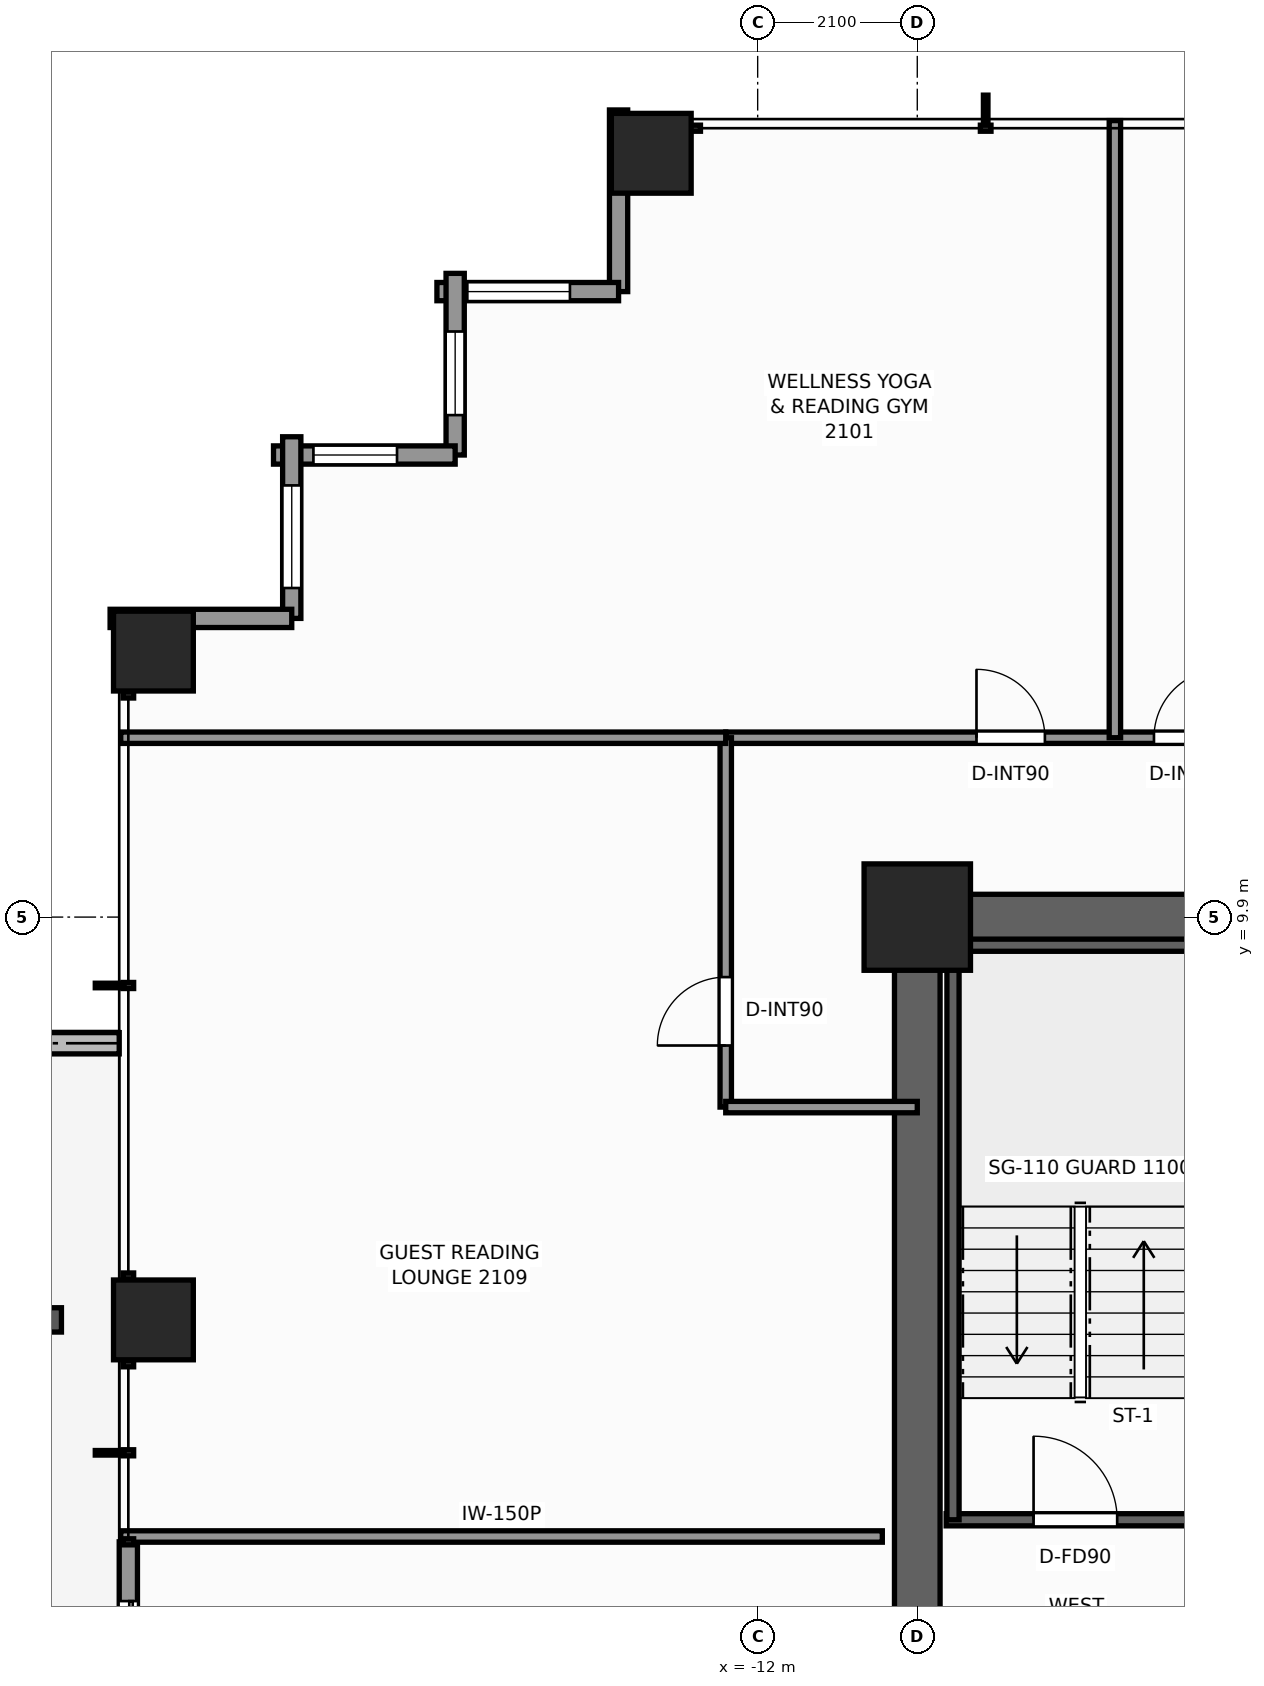
"""IFC4 building model, lengths in metres.
Left out: names, types, materials, properties, quantities, classifications, styles, units other than length and angle.
Written with IfcOpenShell. Run it as: python <this file> out.ifc"""

import sys

from ifc_helpers import new_model, si_unit, direction, frame, frame_2d, origin, origin_2d, place, context, subcontext, project, spatial, rectangle, extrude, element, fill, save


model = new_model("IFC4")
c1 = context("Model", 3, precision=1e-05, world=origin(), true_north=direction((0.0, 1.0)))
c2 = subcontext(c1, "Body", "Model", "MODEL_VIEW")
j1 = project(units=[si_unit("LENGTHUNIT", "METRE"), si_unit("PLANEANGLEUNIT", "RADIAN")], contexts=[c1])
p1 = place(None, origin())
s1 = spatial("IfcSite", under=j1, at=p1, CompositionType="ELEMENT")
p2 = place(p1, origin())
s2 = spatial("IfcBuilding", under=s1, at=p2, CompositionType="ELEMENT")
p3 = place(p2, frame((0.0, 0.0, 75.5)))
s3 = spatial("IfcBuildingStorey", under=s2, at=p3, CompositionType="ELEMENT", Elevation=75.5)
p4 = place(p3, frame((-10.2, 9.9, 0.0), z_axis=(0.0, 0.0, 1.0), x_axis=(1.0, 0.0, 0.0)))
e1 = element("IfcWall", 1, at=p4, inside=s3, PredefinedType="SHEAR", context=c2, shape_type="SweptSolid", body=[
    extrude(rectangle(XDim=14.62, YDim=0.6, at=frame_2d((7.31, 0.0))), origin(), (0.0, 0.0, 1.0), 3.3),
])
p5 = place(p3, frame((-9.9, -3.7, 0.0), z_axis=(0.0, 0.0, 1.0), x_axis=(0.0, 1.0, 0.0)))
e2 = element("IfcWall", 2, at=p5, inside=s3, PredefinedType="SHEAR", context=c2, shape_type="SweptSolid", body=[
    extrude(rectangle(XDim=13.3, YDim=0.6, at=frame_2d((6.65, 0.0))), origin(), (0.0, 0.0, 1.0), 3.3),
])
p6 = place(p5, frame((0.35, 0.0, 0.0)))
e3 = element("IfcOpeningElement", 3, at=p6, cuts=e2, PredefinedType="OPENING", context=c2, shape_type="SweptSolid", body=[
    extrude(rectangle(XDim=1.1, YDim=2.2, at=frame_2d((0.55, 1.1))), frame((0.0, 0.31, 0.0), z_axis=(0.0, -1.0, 0.0), x_axis=(1.0, 0.0, 0.0)), (0.0, 0.0, 1.0), 0.62),
])
p7 = place(p3, frame((-9.9, 9.9, 0.0), z_axis=(0.0, 0.0, 1.0), x_axis=(1.0, 0.0, 0.0)))
e4 = element("IfcColumn", 4, at=p7, inside=s3, PredefinedType="COLUMN", context=c2, shape_type="SweptSolid", body=[
    extrude(rectangle(XDim=1.4, YDim=1.4, at=origin_2d()), origin(), (0.0, 0.0, 1.0), 3.3),
])
for number, where, z_axis, x_axis in (
    (5, (-13.4, 19.95, 0.0), (0.0, 0.0, 1.0), (1.0, 0.0, 0.0)),
    (6, (-19.95, 4.6, 0.0), (0.0, 0.0, 1.0), (1.0, 0.0, 0.0)),
    (7, (-19.95, 13.4, 0.0), (0.0, 0.0, 1.0), (1.0, 0.0, 0.0)),
):
    element("IfcColumn", number, at=place(p3, frame(where, z_axis=z_axis, x_axis=x_axis)), inside=s3, PredefinedType="COLUMN", context=c2, shape_type="SweptSolid", body=[
        extrude(rectangle(XDim=1.05, YDim=1.05, at=origin_2d()), origin(), (0.0, 0.0, 1.0), 3.3),
    ])
p8 = place(p3, frame((-20.4, 8.24, -0.04), z_axis=(0.0, 0.0, 1.0), x_axis=(-1.0, 0.0, 0.0)))
e8 = element("IfcWall", 8, at=p8, inside=s3, PredefinedType="PARAPET", context=c2, shape_type="SweptSolid", body=[
    extrude(rectangle(XDim=1.26, YDim=0.28, at=frame_2d((0.63, 0.0))), origin(), (0.0, 0.0, 1.0), 0.42),
])
p9 = place(p3, frame((-13.83, 18.13, 0.0), z_axis=(0.0, 0.0, 1.0), x_axis=(0.0, 1.0, 0.0)))
e9 = element("IfcWall", 9, at=p9, inside=s3, PredefinedType="STANDARD", context=c2, shape_type="SweptSolid", body=[
    extrude(rectangle(XDim=2.39, YDim=0.24, at=frame_2d((1.195, 0.0))), origin(), (0.0, 0.0, 1.0), 2.459),
])
p10 = place(p3, frame((-16.22, 18.13, 0.0), z_axis=(0.0, 0.0, 1.0), x_axis=(1.0, 0.0, 0.0)))
e10 = element("IfcWall", 10, at=p10, inside=s3, PredefinedType="STANDARD", context=c2, shape_type="SweptSolid", body=[
    extrude(rectangle(XDim=2.39, YDim=0.24, at=frame_2d((1.195, 0.0))), origin(), (0.0, 0.0, 1.0), 2.459),
])
p11 = place(p10, frame((0.4, 0.0, 0.65)))
e11 = element("IfcOpeningElement", 11, at=p11, cuts=e10, PredefinedType="OPENING", context=c2, shape_type="SweptSolid", body=[
    extrude(rectangle(XDim=1.35, YDim=1.55, at=frame_2d((0.675, 0.775))), frame((0.0, 0.13, 0.0), z_axis=(0.0, -1.0, 0.0), x_axis=(1.0, 0.0, 0.0)), (0.0, 0.0, 1.0), 0.26),
])
p12 = place(p3, frame((-15.98, 15.98, 0.0), z_axis=(0.0, 0.0, 1.0), x_axis=(0.0, 1.0, 0.0)))
e12 = element("IfcWall", 12, at=p12, inside=s3, PredefinedType="STANDARD", context=c2, shape_type="SweptSolid", body=[
    extrude(rectangle(XDim=2.39, YDim=0.24, at=frame_2d((1.195, 0.0))), origin(), (0.0, 0.0, 1.0), 2.459),
])
p13 = place(p12, frame((0.525, 0.0, 0.65)))
e13 = element("IfcOpeningElement", 13, at=p13, cuts=e12, PredefinedType="OPENING", context=c2, shape_type="SweptSolid", body=[
    extrude(rectangle(XDim=1.1, YDim=1.45, at=frame_2d((0.55, 0.725))), frame((0.0, 0.13, 0.0), z_axis=(0.0, -1.0, 0.0), x_axis=(1.0, 0.0, 0.0)), (0.0, 0.0, 1.0), 0.26),
])
p14 = place(p3, frame((-18.37, 15.98, 0.0), z_axis=(0.0, 0.0, 1.0), x_axis=(1.0, 0.0, 0.0)))
e14 = element("IfcWall", 14, at=p14, inside=s3, PredefinedType="STANDARD", context=c2, shape_type="SweptSolid", body=[
    extrude(rectangle(XDim=2.39, YDim=0.24, at=frame_2d((1.195, 0.0))), origin(), (0.0, 0.0, 1.0), 2.459),
])
p15 = place(p14, frame((0.525, 0.0, 0.65)))
e15 = element("IfcOpeningElement", 15, at=p15, cuts=e14, PredefinedType="OPENING", context=c2, shape_type="SweptSolid", body=[
    extrude(rectangle(XDim=1.1, YDim=1.45, at=frame_2d((0.55, 0.725))), frame((0.0, 0.13, 0.0), z_axis=(0.0, -1.0, 0.0), x_axis=(1.0, 0.0, 0.0)), (0.0, 0.0, 1.0), 0.26),
])
p16 = place(p3, frame((-18.13, 13.83, 0.0), z_axis=(0.0, 0.0, 1.0), x_axis=(0.0, 1.0, 0.0)))
e16 = element("IfcWall", 16, at=p16, inside=s3, PredefinedType="STANDARD", context=c2, shape_type="SweptSolid", body=[
    extrude(rectangle(XDim=2.39, YDim=0.24, at=frame_2d((1.195, 0.0))), origin(), (0.0, 0.0, 1.0), 2.459),
])
p17 = place(p16, frame((0.4, 0.0, 0.65)))
e17 = element("IfcOpeningElement", 17, at=p17, cuts=e16, PredefinedType="OPENING", context=c2, shape_type="SweptSolid", body=[
    extrude(rectangle(XDim=1.35, YDim=1.55, at=frame_2d((0.675, 0.775))), frame((0.0, 0.13, 0.0), z_axis=(0.0, -1.0, 0.0), x_axis=(1.0, 0.0, 0.0)), (0.0, 0.0, 1.0), 0.26),
])
p18 = place(p3, frame((-20.52, 13.83, 0.0), z_axis=(0.0, 0.0, 1.0), x_axis=(1.0, 0.0, 0.0)))
e18 = element("IfcWall", 18, at=p18, inside=s3, PredefinedType="STANDARD", context=c2, shape_type="SweptSolid", body=[
    extrude(rectangle(XDim=2.39, YDim=0.24, at=frame_2d((1.195, 0.0))), origin(), (0.0, 0.0, 1.0), 2.459),
])
p19 = place(p3, frame((-20.28, -1.68, 0.0), z_axis=(0.0, 0.0, 1.0), x_axis=(0.0, 1.0, 0.0)))
e19 = element("IfcWall", 19, at=p19, inside=s3, PredefinedType="STANDARD", context=c2, shape_type="SweptSolid", body=[
    extrude(rectangle(XDim=3.36, YDim=0.24, at=frame_2d((1.68, 0.0))), origin(), (0.0, 0.0, 1.0), 3.08),
])
p20 = place(p19, frame((0.78, 0.0, 0.0)))
e20 = element("IfcOpeningElement", 20, at=p20, cuts=e19, PredefinedType="OPENING", context=c2, shape_type="SweptSolid", body=[
    extrude(rectangle(XDim=1.8, YDim=2.2, at=frame_2d((0.9, 1.1))), frame((0.0, 0.13, 0.0), z_axis=(0.0, -1.0, 0.0), x_axis=(1.0, 0.0, 0.0)), (0.0, 0.0, 1.0), 0.26),
])
p21 = place(p3, frame((-9.52, 1.97, 0.0), z_axis=(0.0, 0.0, 1.0), x_axis=(1.0, 0.0, 0.0)))
e21 = element("IfcWall", 21, at=p21, inside=s3, PredefinedType="SHEAR", context=c2, shape_type="SweptSolid", body=[
    extrude(rectangle(XDim=3.52, YDim=0.16, at=frame_2d((1.76, 0.0))), origin(), (0.0, 0.0, 1.0), 3.3),
])
p22 = place(p21, frame((1.15, 0.0, 0.0)))
e22 = element("IfcOpeningElement", 22, at=p22, cuts=e21, PredefinedType="OPENING", context=c2, shape_type="SweptSolid", body=[
    extrude(rectangle(XDim=1.1, YDim=2.2, at=frame_2d((0.55, 1.1))), frame((0.0, 0.09, 0.0), z_axis=(0.0, -1.0, 0.0), x_axis=(1.0, 0.0, 0.0)), (0.0, 0.0, 1.0), 0.18),
])
p23 = place(p3, frame((-9.52, 9.53, 0.0), z_axis=(0.0, 0.0, 1.0), x_axis=(1.0, 0.0, 0.0)))
e23 = element("IfcWall", 23, at=p23, inside=s3, PredefinedType="SHEAR", context=c2, shape_type="SweptSolid", body=[
    extrude(rectangle(XDim=3.52, YDim=0.16, at=frame_2d((1.76, 0.0))), origin(), (0.0, 0.0, 1.0), 3.3),
])
p24 = place(p3, frame((-9.43, 1.97, 0.0), z_axis=(0.0, 0.0, 1.0), x_axis=(0.0, 1.0, 0.0)))
e24 = element("IfcWall", 24, at=p24, inside=s3, PredefinedType="SHEAR", context=c2, shape_type="SweptSolid", body=[
    extrude(rectangle(XDim=7.56, YDim=0.16, at=frame_2d((3.78, 0.0))), origin(), (0.0, 0.0, 1.0), 3.3),
])
p25 = place(p3, frame((-12.42, 12.26, 0.0), z_axis=(0.0, 0.0, 1.0), x_axis=(1.0, 0.0, 0.0)))
e25 = element("IfcWall", 25, at=p25, inside=s3, PredefinedType="PARTITIONING", context=c2, shape_type="SweptSolid", body=[
    extrude(rectangle(XDim=25.0, YDim=0.15, at=frame_2d((12.5, 0.0))), origin(), (0.0, 0.0, 1.0), 2.292),
])
p26 = place(p25, frame((3.299, 0.0, 0.0)))
e26 = element("IfcOpeningElement", 26, at=p26, cuts=e25, PredefinedType="OPENING", context=c2, shape_type="SweptSolid", body=[
    extrude(rectangle(XDim=0.9, YDim=2.06, at=frame_2d((0.45, 1.03))), frame((0.0, 0.085, 0.0), z_axis=(0.0, -1.0, 0.0), x_axis=(1.0, 0.0, 0.0)), (0.0, 0.0, 1.0), 0.17),
])
p27 = place(p25, frame((5.634, 0.0, 0.0)))
e27 = element("IfcOpeningElement", 27, at=p27, cuts=e25, PredefinedType="OPENING", context=c2, shape_type="SweptSolid", body=[
    extrude(rectangle(XDim=0.9, YDim=2.06, at=frame_2d((0.45, 1.03))), frame((0.0, 0.085, 0.0), z_axis=(0.0, -1.0, 0.0), x_axis=(1.0, 0.0, 0.0)), (0.0, 0.0, 1.0), 0.17),
])
p28 = place(p25, frame((9.758, 0.0, 0.0)))
e28 = element("IfcOpeningElement", 28, at=p28, cuts=e25, PredefinedType="OPENING", context=c2, shape_type="SweptSolid", body=[
    extrude(rectangle(XDim=0.9, YDim=2.06, at=frame_2d((0.45, 1.03))), frame((0.0, 0.085, 0.0), z_axis=(0.0, -1.0, 0.0), x_axis=(1.0, 0.0, 0.0)), (0.0, 0.0, 1.0), 0.17),
])
p29 = place(p25, frame((13.357, 0.0, 0.0)))
e29 = element("IfcOpeningElement", 29, at=p29, cuts=e25, PredefinedType="OPENING", context=c2, shape_type="SweptSolid", body=[
    extrude(rectangle(XDim=0.95, YDim=2.06, at=frame_2d((0.475, 1.03))), frame((0.0, 0.085, 0.0), z_axis=(0.0, -1.0, 0.0), x_axis=(1.0, 0.0, 0.0)), (0.0, 0.0, 1.0), 0.17),
])
p30 = place(p25, frame((18.125, 0.0, 0.0)))
e30 = element("IfcOpeningElement", 30, at=p30, cuts=e25, PredefinedType="OPENING", context=c2, shape_type="SweptSolid", body=[
    extrude(rectangle(XDim=0.9, YDim=2.06, at=frame_2d((0.45, 1.03))), frame((0.0, 0.085, 0.0), z_axis=(0.0, -1.0, 0.0), x_axis=(1.0, 0.0, 0.0)), (0.0, 0.0, 1.0), 0.17),
])
p31 = place(p25, frame((20.129, 0.0, 0.0)))
e31 = element("IfcOpeningElement", 31, at=p31, cuts=e25, PredefinedType="OPENING", context=c2, shape_type="SweptSolid", body=[
    extrude(rectangle(XDim=0.95, YDim=2.06, at=frame_2d((0.475, 1.03))), frame((0.0, 0.085, 0.0), z_axis=(0.0, -1.0, 0.0), x_axis=(1.0, 0.0, 0.0)), (0.0, 0.0, 1.0), 0.17),
])
p32 = place(p3, frame((-12.42, 7.4, 0.0), z_axis=(0.0, 0.0, 1.0), x_axis=(0.0, 1.0, 0.0)))
e32 = element("IfcWall", 32, at=p32, inside=s3, PredefinedType="PARTITIONING", context=c2, shape_type="SweptSolid", body=[
    extrude(rectangle(XDim=4.86, YDim=0.15, at=frame_2d((2.43, 0.0))), origin(), (0.0, 0.0, 1.0), 2.292),
])
p33 = place(p32, frame((0.81, 0.0, 0.0)))
e33 = element("IfcOpeningElement", 33, at=p33, cuts=e32, PredefinedType="OPENING", context=c2, shape_type="SweptSolid", body=[
    extrude(rectangle(XDim=0.9, YDim=2.06, at=frame_2d((0.45, 1.03))), frame((0.0, 0.085, 0.0), z_axis=(0.0, -1.0, 0.0), x_axis=(1.0, 0.0, 0.0)), (0.0, 0.0, 1.0), 0.17),
])
p34 = place(p3, frame((-12.42, 7.4, 0.0), z_axis=(0.0, 0.0, 1.0), x_axis=(1.0, 0.0, 0.0)))
e34 = element("IfcWall", 34, at=p34, inside=s3, PredefinedType="PARTITIONING", context=c2, shape_type="SweptSolid", body=[
    extrude(rectangle(XDim=2.52, YDim=0.15, at=frame_2d((1.26, 0.0))), origin(), (0.0, 0.0, 1.0), 3.08),
])
p35 = place(p3, frame((-20.38, 12.26, 0.0), z_axis=(0.0, 0.0, 1.0), x_axis=(1.0, 0.0, 0.0)))
e35 = element("IfcWall", 35, at=p35, inside=s3, PredefinedType="PARTITIONING", context=c2, shape_type="SweptSolid", body=[
    extrude(rectangle(XDim=7.96, YDim=0.15, at=frame_2d((3.98, 0.0))), origin(), (0.0, 0.0, 1.0), 2.292),
])
p36 = place(p3, frame((-7.3, 12.26, 0.0), z_axis=(0.0, 0.0, 1.0), x_axis=(0.0, 1.0, 0.0)))
e36 = element("IfcWall", 36, at=p36, inside=s3, PredefinedType="PARTITIONING", context=c2, shape_type="SweptSolid", body=[
    extrude(rectangle(XDim=8.12, YDim=0.15, at=frame_2d((4.06, 0.0))), origin(), (0.0, 0.0, 1.0), 2.449),
])
p37 = place(p3, frame((-20.38, 1.75, 0.0), z_axis=(0.0, 0.0, 1.0), x_axis=(1.0, 0.0, 0.0)))
e37 = element("IfcWall", 37, at=p37, inside=s3, PredefinedType="PARTITIONING", context=c2, shape_type="SweptSolid", body=[
    extrude(rectangle(XDim=10.02, YDim=0.15, at=frame_2d((5.01, 0.0))), origin(), (0.0, 0.0, 1.0), 2.449),
])
p38 = place(p11, origin())
e38 = element("IfcWindow", 38, at=p38, inside=s3, PartitioningType="SINGLE_PANEL", PredefinedType="WINDOW", context=c2, shape_type="SweptSolid", body=[
    extrude(rectangle(XDim=1.35, YDim=1.55, at=frame_2d((0.675, 0.775))), frame((0.0, 0.03, 0.0), z_axis=(0.0, -1.0, 0.0), x_axis=(1.0, 0.0, 0.0)), (0.0, 0.0, 1.0), 0.06),
])
fill(e11, e38)
p39 = place(p13, origin())
e39 = element("IfcWindow", 39, at=p39, inside=s3, PartitioningType="SINGLE_PANEL", PredefinedType="WINDOW", context=c2, shape_type="SweptSolid", body=[
    extrude(rectangle(XDim=1.1, YDim=1.45, at=frame_2d((0.55, 0.725))), frame((0.0, 0.03, 0.0), z_axis=(0.0, -1.0, 0.0), x_axis=(1.0, 0.0, 0.0)), (0.0, 0.0, 1.0), 0.06),
])
fill(e13, e39)
p40 = place(p15, origin())
e40 = element("IfcWindow", 40, at=p40, inside=s3, PartitioningType="SINGLE_PANEL", PredefinedType="WINDOW", context=c2, shape_type="SweptSolid", body=[
    extrude(rectangle(XDim=1.1, YDim=1.45, at=frame_2d((0.55, 0.725))), frame((0.0, 0.03, 0.0), z_axis=(0.0, -1.0, 0.0), x_axis=(1.0, 0.0, 0.0)), (0.0, 0.0, 1.0), 0.06),
])
fill(e15, e40)
p41 = place(p17, origin())
e41 = element("IfcWindow", 41, at=p41, inside=s3, PartitioningType="SINGLE_PANEL", PredefinedType="WINDOW", context=c2, shape_type="SweptSolid", body=[
    extrude(rectangle(XDim=1.35, YDim=1.55, at=frame_2d((0.675, 0.775))), frame((0.0, 0.03, 0.0), z_axis=(0.0, -1.0, 0.0), x_axis=(1.0, 0.0, 0.0)), (0.0, 0.0, 1.0), 0.06),
])
fill(e17, e41)
p42 = place(p20, origin())
e42 = element("IfcDoor", 42, at=p42, inside=s3, OperationType="DOUBLE_DOOR_SLIDING", PredefinedType="DOOR", context=c2, shape_type="SweptSolid", body=[
    extrude(rectangle(XDim=1.8, YDim=2.2, at=frame_2d((0.9, 1.1))), frame((0.0, 0.025, 0.0), z_axis=(0.0, -1.0, 0.0), x_axis=(1.0, 0.0, 0.0)), (0.0, 0.0, 1.0), 0.05),
])
fill(e20, e42)
p43 = place(p22, origin())
e43 = element("IfcDoor", 43, at=p43, inside=s3, OperationType="SINGLE_SWING_LEFT", PredefinedType="DOOR", context=c2, shape_type="SweptSolid", body=[
    extrude(rectangle(XDim=1.1, YDim=2.2, at=frame_2d((0.55, 1.1))), frame((0.0, 0.025, 0.0), z_axis=(0.0, -1.0, 0.0), x_axis=(1.0, 0.0, 0.0)), (0.0, 0.0, 1.0), 0.05),
])
fill(e22, e43)
p44 = place(p26, origin())
e44 = element("IfcDoor", 44, at=p44, inside=s3, OperationType="SINGLE_SWING_LEFT", PredefinedType="DOOR", context=c2, shape_type="SweptSolid", body=[
    extrude(rectangle(XDim=0.9, YDim=2.06, at=frame_2d((0.45, 1.03))), frame((0.0, 0.025, 0.0), z_axis=(0.0, -1.0, 0.0), x_axis=(1.0, 0.0, 0.0)), (0.0, 0.0, 1.0), 0.05),
])
fill(e26, e44)
p45 = place(p27, origin())
e45 = element("IfcDoor", 45, at=p45, inside=s3, OperationType="SINGLE_SWING_RIGHT", PredefinedType="DOOR", context=c2, shape_type="SweptSolid", body=[
    extrude(rectangle(XDim=0.9, YDim=2.06, at=frame_2d((0.45, 1.03))), frame((0.0, 0.025, 0.0), z_axis=(0.0, -1.0, 0.0), x_axis=(1.0, 0.0, 0.0)), (0.0, 0.0, 1.0), 0.05),
])
fill(e27, e45)
p46 = place(p33, origin())
e46 = element("IfcDoor", 46, at=p46, inside=s3, OperationType="SINGLE_SWING_LEFT", PredefinedType="DOOR", context=c2, shape_type="SweptSolid", body=[
    extrude(rectangle(XDim=0.9, YDim=2.06, at=frame_2d((0.45, 1.03))), frame((0.0, 0.025, 0.0), z_axis=(0.0, -1.0, 0.0), x_axis=(1.0, 0.0, 0.0)), (0.0, 0.0, 1.0), 0.05),
])
fill(e33, e46)
save(model, sys.argv[1])
